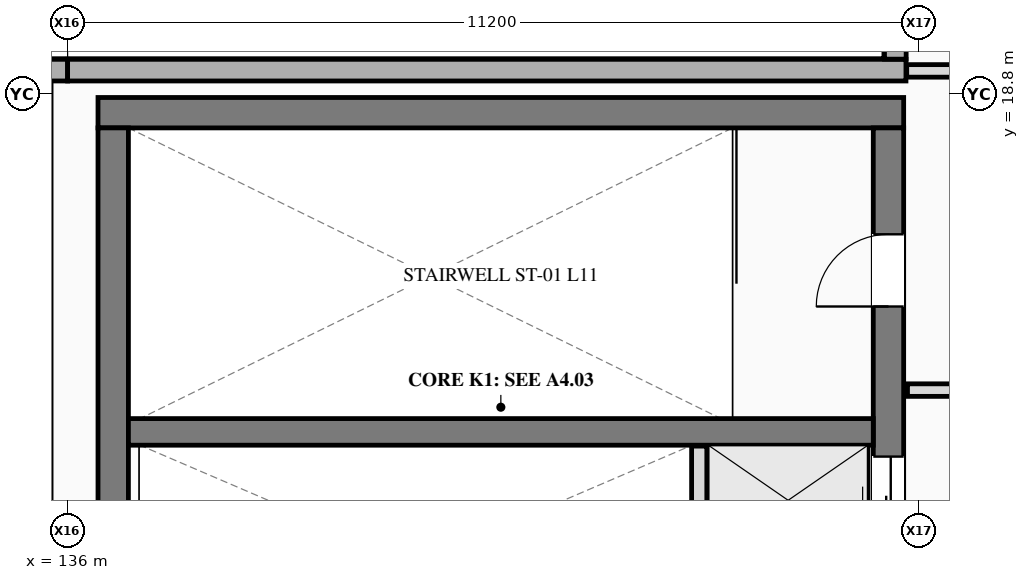
"""IFC4 building model, lengths in metres.
Left out: names, types, materials, properties, quantities, classifications, styles, units other than length and angle.
Written with IfcOpenShell. Run it as: python <this file> out.ifc"""

import sys

from ifc_helpers import new_model, si_unit, direction, frame, frame_2d, origin, place, context, subcontext, project, spatial, rectangle, extrude, element, fill, save


model = new_model("IFC4")
c1 = context("Model", 3, precision=1e-05, world=origin(), true_north=direction((0.0, 1.0)))
c2 = subcontext(c1, "Body", "Model", "MODEL_VIEW")
j1 = project(units=[si_unit("LENGTHUNIT", "METRE"), si_unit("PLANEANGLEUNIT", "RADIAN")], contexts=[c1])
p1 = place(None, origin())
s1 = spatial("IfcSite", under=j1, at=p1, CompositionType="ELEMENT")
p2 = place(p1, origin())
s2 = spatial("IfcBuilding", under=s1, at=p2, CompositionType="ELEMENT")
p3 = place(p2, frame((0.0, 0.0, 44.6)))
s3 = spatial("IfcBuildingStorey", under=s2, at=p3, CompositionType="ELEMENT", Elevation=44.6)
p4 = place(p3, frame((136.0, 19.11, 0.0), z_axis=(0.0, 0.0, 1.0), x_axis=(-1.0, 0.0, 0.0)))
e1 = element("IfcWall", 1, at=p4, inside=s3, PredefinedType="STANDARD", context=c2, shape_type="SweptSolid", body=[
    extrude(rectangle(XDim=12.0, YDim=0.285, at=frame_2d((6.0, 0.0))), origin(), (0.0, 0.0, 1.0), 3.6),
])
p5 = place(p4, frame((5.0, 0.0, 0.85)))
e2 = element("IfcOpeningElement", 2, at=p5, cuts=e1, PredefinedType="OPENING", context=c2, shape_type="SweptSolid", body=[
    extrude(rectangle(XDim=2.0, YDim=1.65, at=frame_2d((1.0, 0.825))), frame((0.0, 0.152, 0.0), z_axis=(0.0, -1.0, 0.0), x_axis=(1.0, 0.0, 0.0)), (0.0, 0.0, 1.0), 0.305),
])
p6 = place(p3, frame((147.03, 19.11, 0.0), z_axis=(0.0, 0.0, 1.0), x_axis=(-1.0, 0.0, 0.0)))
e3 = element("IfcWall", 3, at=p6, inside=s3, PredefinedType="STANDARD", context=c2, shape_type="SweptSolid", body=[
    extrude(rectangle(XDim=11.03, YDim=0.285, at=frame_2d((5.515, 0.0))), origin(), (0.0, 0.0, 1.0), 3.6),
])
p7 = place(p3, frame((146.89, 19.254, 0.0), z_axis=(0.0, 0.0, 1.0), x_axis=(0.0, 1.0, 0.0)))
e4 = element("IfcWall", 4, at=p7, inside=s3, PredefinedType="STANDARD", context=c2, shape_type="SweptSolid", body=[
    extrude(rectangle(XDim=5.546, YDim=0.285, at=frame_2d((2.773, 0.0))), origin(), (0.0, 0.0, 1.0), 3.6),
])
p8 = place(p7, frame((1.598, 0.0, 0.85)))
e5 = element("IfcOpeningElement", 5, at=p8, cuts=e4, PredefinedType="OPENING", context=c2, shape_type="SweptSolid", body=[
    extrude(rectangle(XDim=2.0, YDim=1.65, at=frame_2d((1.0, 0.825))), frame((0.0, 0.152, 0.0), z_axis=(0.0, -1.0, 0.0), x_axis=(1.0, 0.0, 0.0)), (0.0, 0.0, 1.0), 0.305),
])
p9 = place(p3, frame((147.0, 18.55, 0.0), z_axis=(0.0, 0.0, 1.0), x_axis=(-1.0, 0.0, 0.0)))
e6 = element("IfcWall", 6, at=p9, inside=s3, PredefinedType="SHEAR", context=c2, shape_type="SweptSolid", body=[
    extrude(rectangle(XDim=10.6, YDim=0.4, at=frame_2d((5.3, 0.0))), origin(), (0.0, 0.0, 1.0), 3.6),
])
p10 = place(p3, frame((136.6, 18.35, 0.0), z_axis=(0.0, 0.0, 1.0), x_axis=(0.0, -1.0, 0.0)))
e7 = element("IfcWall", 7, at=p10, inside=s3, PredefinedType="SHEAR", context=c2, shape_type="SweptSolid", body=[
    extrude(rectangle(XDim=7.35, YDim=0.4, at=frame_2d((3.675, 0.0))), origin(), (0.0, 0.0, 1.0), 3.6),
])
p11 = place(p3, frame((146.8, 11.0, 0.0), z_axis=(0.0, 0.0, 1.0), x_axis=(0.0, 1.0, 0.0)))
e8 = element("IfcWall", 8, at=p11, inside=s3, PredefinedType="SHEAR", context=c2, shape_type="SweptSolid", body=[
    extrude(rectangle(XDim=7.35, YDim=0.4, at=frame_2d((3.675, 0.0))), origin(), (0.0, 0.0, 1.0), 3.6),
])
p12 = place(p11, frame((5.0, 0.0, 0.0)))
e9 = element("IfcOpeningElement", 9, at=p12, cuts=e8, PredefinedType="OPENING", context=c2, shape_type="SweptSolid", body=[
    extrude(rectangle(XDim=0.95, YDim=2.2, at=frame_2d((0.475, 1.1))), frame((0.0, 0.21, 0.0), z_axis=(0.0, -1.0, 0.0), x_axis=(1.0, 0.0, 0.0)), (0.0, 0.0, 1.0), 0.42),
])
p13 = place(p11, frame((0.175, 0.0, 0.0)))
e10 = element("IfcOpeningElement", 10, at=p13, cuts=e8, PredefinedType="OPENING", context=c2, shape_type="SweptSolid", body=[
    extrude(rectangle(XDim=1.15, YDim=2.25, at=frame_2d((0.575, 1.125))), frame((0.0, 0.21, 0.0), z_axis=(0.0, -1.0, 0.0), x_axis=(1.0, 0.0, 0.0)), (0.0, 0.0, 1.0), 0.42),
])
p14 = place(p11, frame((1.875, 0.0, 0.0)))
e11 = element("IfcOpeningElement", 11, at=p14, cuts=e8, PredefinedType="OPENING", context=c2, shape_type="SweptSolid", body=[
    extrude(rectangle(XDim=1.15, YDim=2.25, at=frame_2d((0.575, 1.125))), frame((0.0, 0.21, 0.0), z_axis=(0.0, -1.0, 0.0), x_axis=(1.0, 0.0, 0.0)), (0.0, 0.0, 1.0), 0.42),
])
p15 = place(p3, frame((136.8, 14.35, 0.0), z_axis=(0.0, 0.0, 1.0), x_axis=(1.0, 0.0, 0.0)))
e12 = element("IfcWall", 12, at=p15, inside=s3, PredefinedType="SHEAR", context=c2, shape_type="SweptSolid", body=[
    extrude(rectangle(XDim=9.8, YDim=0.35, at=frame_2d((4.9, 0.0))), origin(), (0.0, 0.0, 1.0), 3.6),
])
p16 = place(p3, frame((144.31, 12.707, 0.0), z_axis=(0.0, 0.0, 1.0), x_axis=(0.0, 1.0, 0.0)))
e13 = element("IfcWall", 13, at=p16, inside=s3, PredefinedType="PLUMBINGWALL", context=c2, shape_type="SweptSolid", body=[
    extrude(rectangle(XDim=1.456, YDim=0.2, at=frame_2d((0.728, 0.0))), origin(), (0.0, 0.0, 1.0), 3.3),
])
p17 = place(p3, frame((147.05, 14.9, 0.0), z_axis=(0.0, 0.0, 1.0), x_axis=(1.0, 0.0, 0.0)))
e14 = element("IfcWall", 14, at=p17, inside=s3, PredefinedType="PARTITIONING", context=c2, shape_type="SweptSolid", body=[
    extrude(rectangle(XDim=4.55, YDim=0.165, at=frame_2d((2.275, 0.0))), origin(), (0.0, 0.0, 1.0), 3.3),
])
p18 = place(p17, frame((1.8, 0.0, 0.0)))
e15 = element("IfcOpeningElement", 15, at=p18, cuts=e14, PredefinedType="OPENING", context=c2, shape_type="SweptSolid", body=[
    extrude(rectangle(XDim=0.95, YDim=2.2, at=frame_2d((0.475, 1.1))), frame((0.0, 0.093, 0.0), z_axis=(0.0, -1.0, 0.0), x_axis=(1.0, 0.0, 0.0)), (0.0, 0.0, 1.0), 0.185),
])
p19 = place(p3, frame((147.04, 19.1, 0.0), z_axis=(0.0, 0.0, 1.0), x_axis=(1.0, 0.0, 0.0)))
e16 = element("IfcWall", 16, at=p19, inside=s3, PredefinedType="PARTITIONING", context=c2, shape_type="SweptSolid", body=[
    extrude(rectangle(XDim=8.22, YDim=0.165, at=frame_2d((4.11, 0.0))), origin(), (0.0, 0.0, 1.0), 3.3),
])
p20 = place(p12, origin())
e17 = element("IfcDoor", 17, at=p20, inside=s3, OperationType="SINGLE_SWING_LEFT", PredefinedType="DOOR", context=c2, shape_type="SweptSolid", body=[
    extrude(rectangle(XDim=0.95, YDim=2.2, at=frame_2d((0.475, 1.1))), frame((0.0, 0.025, 0.0), z_axis=(0.0, -1.0, 0.0), x_axis=(1.0, 0.0, 0.0)), (0.0, 0.0, 1.0), 0.05),
])
fill(e9, e17)
p21 = place(p14, origin())
e18 = element("IfcDoor", 18, at=p21, inside=s3, OperationType="SLIDING_TO_RIGHT", PredefinedType="DOOR", context=c2, shape_type="SweptSolid", body=[
    extrude(rectangle(XDim=1.15, YDim=2.25, at=frame_2d((0.575, 1.125))), frame((0.0, 0.025, 0.0), z_axis=(0.0, -1.0, 0.0), x_axis=(1.0, 0.0, 0.0)), (0.0, 0.0, 1.0), 0.05),
])
fill(e11, e18)
save(model, sys.argv[1])
